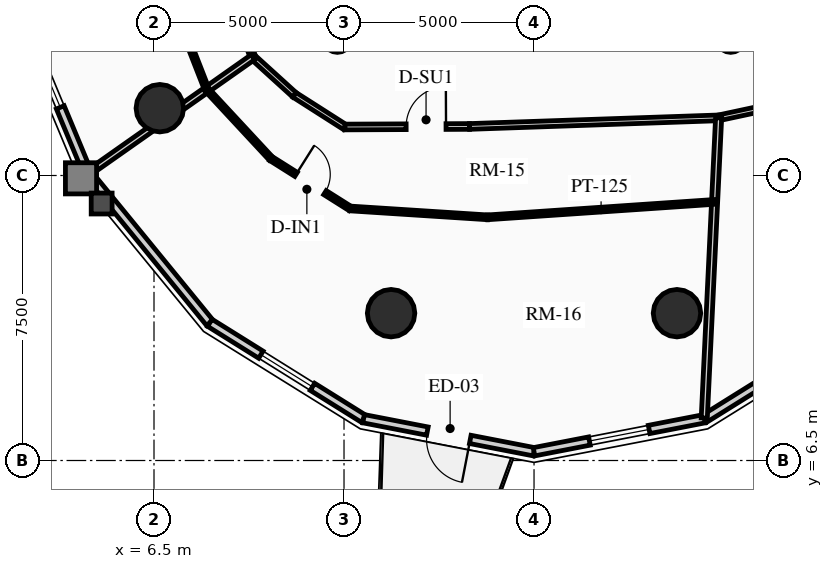
"""IFC4 building model, lengths in metres.
Left out: names, types, materials, properties, quantities, classifications, styles, units other than length and angle.
Written with IfcOpenShell. Run it as: python <this file> out.ifc"""

import sys

from ifc_helpers import new_model, si_unit, direction, frame, frame_2d, origin, origin_2d, place, context, subcontext, project, spatial, rectangle, circle, hollow_circle, extrude, source, transform, mapped, element, fill, save


model = new_model("IFC4")
c1 = context("Model", 3, precision=1e-05, world=origin(), true_north=direction((0.0, 1.0)))
c2 = subcontext(c1, "Body", "Model", "MODEL_VIEW")
j1 = project(units=[si_unit("LENGTHUNIT", "METRE"), si_unit("PLANEANGLEUNIT", "RADIAN")], contexts=[c1])
p1 = place(None, origin())
s1 = spatial("IfcSite", under=j1, at=p1, CompositionType="ELEMENT")
p2 = place(p1, origin())
s2 = spatial("IfcBuilding", under=s1, at=p2, CompositionType="ELEMENT")
p3 = place(p2, frame((0.0, 0.0, 160.33)))
s3 = spatial("IfcBuildingStorey", under=s2, at=p3, CompositionType="ELEMENT", Elevation=160.33)
for number, where, z_axis, x_axis in (
    (1, (11.325, 17.62, 0.0), (0.0, 0.0, 1.0), (1.0, 0.0, 0.0)),
    (2, (21.675, 17.62, 0.0), (0.0, 0.0, 1.0), (1.0, 0.0, 0.0)),
):
    element("IfcColumn", number, at=place(p3, frame(where, z_axis=z_axis, x_axis=x_axis)), inside=s3, PredefinedType="COLUMN", context=c2, shape_type="SweptSolid", body=[
        extrude(hollow_circle(Radius=0.38, WallThickness=0.032, at=origin_2d()), origin(), (0.0, 0.0, 1.0), 2.91),
    ])
for number, where, z_axis, x_axis in (
    (3, (6.653, 15.771, 0.0), (0.0, 0.0, 1.0), (1.0, 0.0, 0.0)),
    (4, (12.739, 10.377, 0.0), (0.0, 0.0, 1.0), (1.0, 0.0, 0.0)),
    (5, (20.261, 10.377, 0.0), (0.0, 0.0, 1.0), (1.0, 0.0, 0.0)),
):
    element("IfcColumn", number, at=place(p3, frame(where, z_axis=z_axis, x_axis=x_axis)), inside=s3, PredefinedType="USERDEFINED", context=c2, shape_type="SweptSolid", body=[
        extrude(circle(Radius=0.625, at=origin_2d()), origin(), (0.0, 0.0, 1.0), 2.91),
    ])
p4 = place(p3, frame((4.757, 14.055, 0.0), z_axis=(0.0, 0.0, 1.0), x_axis=(-0.384259959969, 0.923224936386, 0.0)))
e6 = element("IfcWall", 6, at=p4, inside=s3, PredefinedType="SOLIDWALL", context=c2, shape_type="SweptSolid", body=[
    extrude(rectangle(XDim=5.365, YDim=0.22, at=frame_2d((2.683, 0.0))), origin(), (0.0, 0.0, 1.0), 2.245),
])
m1 = source(origin(), c2, "Body", "SweptSolid", [
    extrude(rectangle(XDim=1.6, YDim=1.3, at=frame_2d((0.8, 0.65))), frame((0.0, 0.12, 0.0), z_axis=(0.0, -1.0, 0.0), x_axis=(1.0, 0.0, 0.0)), (0.0, 0.0, 1.0), 0.24),
])
p5 = place(p4, frame((1.883, 0.0, 0.65)))
e7 = element("IfcOpeningElement", 7, at=p5, cuts=e6, PredefinedType="OPENING", context=c2, shape_type="MappedRepresentation", body=[
    mapped(m1, transform((0.0, 0.0, 0.0), x_axis=(1.0, 0.0, 0.0), y_axis=(0.0, 1.0, 0.0), z_axis=(0.0, 0.0, 1.0), scale=1.0)),
])
p6 = place(p3, frame((7.968, 10.124, 0.0), z_axis=(0.0, 0.0, 1.0), x_axis=(-0.632598524901, 0.774479894053, 0.0)))
e8 = element("IfcWall", 8, at=p6, inside=s3, PredefinedType="SOLIDWALL", context=c2, shape_type="SweptSolid", body=[
    extrude(rectangle(XDim=5.076, YDim=0.22, at=frame_2d((2.538, 0.0))), origin(), (0.0, 0.0, 1.0), 2.245),
])
p7 = place(p3, frame((12.015, 7.6, 0.0), z_axis=(0.0, 0.0, 1.0), x_axis=(-0.848452391194, 0.529271707044, 0.0)))
e9 = element("IfcWall", 9, at=p7, inside=s3, PredefinedType="SOLIDWALL", context=c2, shape_type="SweptSolid", body=[
    extrude(rectangle(XDim=4.769, YDim=0.22, at=frame_2d((2.385, 0.0))), origin(), (0.0, 0.0, 1.0), 2.245),
])
p8 = place(p7, frame((1.585, 0.0, 0.65)))
e10 = element("IfcOpeningElement", 10, at=p8, cuts=e9, PredefinedType="OPENING", context=c2, shape_type="MappedRepresentation", body=[
    mapped(m1, transform((0.0, 0.0, 0.0), x_axis=(1.0, 0.0, 0.0), y_axis=(0.0, 1.0, 0.0), z_axis=(0.0, 0.0, 1.0), scale=1.0)),
])
p9 = place(p3, frame((16.5, 6.73, 0.0), z_axis=(0.0, 0.0, 1.0), x_axis=(-0.981718699963, 0.190337579429, 0.0)))
e11 = element("IfcWall", 11, at=p9, inside=s3, PredefinedType="SOLIDWALL", context=c2, shape_type="SweptSolid", body=[
    extrude(rectangle(XDim=4.569, YDim=0.22, at=frame_2d((2.284, 0.0))), origin(), (0.0, 0.0, 1.0), 2.245),
])
m2 = source(origin(), c2, "Body", "SweptSolid", [
    extrude(rectangle(XDim=1.15, YDim=2.005, at=frame_2d((0.575, 1.002))), frame((0.0, 0.12, 0.0), z_axis=(0.0, -1.0, 0.0), x_axis=(1.0, 0.0, 0.0)), (0.0, 0.0, 1.0), 0.24),
])
p10 = place(p9, frame((1.709, 0.0, 0.0)))
e12 = element("IfcOpeningElement", 12, at=p10, cuts=e11, PredefinedType="OPENING", context=c2, shape_type="MappedRepresentation", body=[
    mapped(m2, transform((0.0, 0.0, 0.0), x_axis=(1.0, 0.0, 0.0), y_axis=(0.0, 1.0, 0.0), z_axis=(0.0, 0.0, 1.0), scale=1.0)),
])
p11 = place(p3, frame((20.985, 7.6, 0.0), z_axis=(0.0, 0.0, 1.0), x_axis=(-0.981718699963, -0.190337579429, 0.0)))
e13 = element("IfcWall", 13, at=p11, inside=s3, PredefinedType="SOLIDWALL", context=c2, shape_type="SweptSolid", body=[
    extrude(rectangle(XDim=4.569, YDim=0.22, at=frame_2d((2.284, 0.0))), origin(), (0.0, 0.0, 1.0), 2.245),
])
p12 = place(p11, frame((1.484, 0.0, 0.65)))
e14 = element("IfcOpeningElement", 14, at=p12, cuts=e13, PredefinedType="OPENING", context=c2, shape_type="MappedRepresentation", body=[
    mapped(m1, transform((0.0, 0.0, 0.0), x_axis=(1.0, 0.0, 0.0), y_axis=(0.0, 1.0, 0.0), z_axis=(0.0, 0.0, 1.0), scale=1.0)),
])
p13 = place(p3, frame((25.032, 10.124, 0.0), z_axis=(0.0, 0.0, 1.0), x_axis=(-0.848452391194, -0.529271707044, 0.0)))
e15 = element("IfcWall", 15, at=p13, inside=s3, PredefinedType="SOLIDWALL", context=c2, shape_type="SweptSolid", body=[
    extrude(rectangle(XDim=4.769, YDim=0.22, at=frame_2d((2.385, 0.0))), origin(), (0.0, 0.0, 1.0), 2.245),
])
p14 = place(p3, frame((8.636, 18.436, 0.0), z_axis=(0.0, 0.0, 1.0), x_axis=(0.333211866524, -0.942851977782, 0.0)))
e16 = element("IfcWall", 16, at=p14, inside=s3, PredefinedType="PARTITIONING", context=c2, shape_type="SweptSolid", body=[
    extrude(rectangle(XDim=1.402, YDim=0.15, at=frame_2d((0.701, 0.0))), origin(), (0.0, 0.0, 1.0), 2.245),
])
p15 = place(p3, frame((9.103, 17.115, 0.0), z_axis=(0.0, 0.0, 1.0), x_axis=(0.740186897911, -0.672401186912, 0.0)))
e17 = element("IfcWall", 17, at=p15, inside=s3, PredefinedType="PARTITIONING", context=c2, shape_type="SweptSolid", body=[
    extrude(rectangle(XDim=1.477, YDim=0.15, at=frame_2d((0.738, 0.0))), origin(), (0.0, 0.0, 1.0), 2.245),
])
p16 = place(p3, frame((10.196, 16.122, 0.0), z_axis=(0.0, 0.0, 1.0), x_axis=(0.843021142441, -0.537880426673, 0.0)))
e18 = element("IfcWall", 18, at=p16, inside=s3, PredefinedType="PARTITIONING", context=c2, shape_type="SweptSolid", body=[
    extrude(rectangle(XDim=1.571, YDim=0.15, at=frame_2d((0.786, 0.0))), origin(), (0.0, 0.0, 1.0), 2.245),
])
p17 = place(p3, frame((11.521, 15.276, 0.0), z_axis=(0.0, 0.0, 1.0), x_axis=(0.999990688463, 0.004315436007, 0.0)))
e19 = element("IfcWall", 19, at=p17, inside=s3, PredefinedType="PARTITIONING", context=c2, shape_type="SweptSolid", body=[
    extrude(rectangle(XDim=3.281, YDim=0.15, at=frame_2d((1.641, 0.0))), origin(), (0.0, 0.0, 1.0), 2.245),
])
m3 = source(origin(), c2, "Body", "SweptSolid", [
    extrude(rectangle(XDim=1.05, YDim=2.015, at=frame_2d((0.525, 1.007))), frame((0.0, 0.085, 0.0), z_axis=(0.0, -1.0, 0.0), x_axis=(1.0, 0.0, 0.0)), (0.0, 0.0, 1.0), 0.17),
])
p18 = place(p17, frame((1.613, 0.0, 0.0)))
e20 = element("IfcOpeningElement", 20, at=p18, cuts=e19, PredefinedType="OPENING", context=c2, shape_type="MappedRepresentation", body=[
    mapped(m3, transform((0.0, 0.0, 0.0), x_axis=(1.0, 0.0, 0.0), y_axis=(0.0, 1.0, 0.0), z_axis=(0.0, 0.0, 1.0), scale=1.0)),
])
p19 = place(p3, frame((14.802, 15.291, 0.0), z_axis=(0.0, 0.0, 1.0), x_axis=(0.999405778293, 0.034468686011, 0.0)))
e21 = element("IfcWall", 21, at=p19, inside=s3, PredefinedType="PARTITIONING", context=c2, shape_type="SweptSolid", body=[
    extrude(rectangle(XDim=6.559, YDim=0.15, at=frame_2d((3.279, 0.0))), origin(), (0.0, 0.0, 1.0), 2.245),
])
p20 = place(p3, frame((21.357, 15.517, 0.0), z_axis=(0.0, 0.0, 1.0), x_axis=(0.977773676035, 0.209663154733, 0.0)))
e22 = element("IfcWall", 22, at=p20, inside=s3, PredefinedType="PARTITIONING", context=c2, shape_type="SweptSolid", body=[
    extrude(rectangle(XDim=1.865, YDim=0.15, at=frame_2d((0.933, 0.0))), origin(), (0.0, 0.0, 1.0), 2.245),
])
p21 = place(p3, frame((9.103, 17.115, 0.0), z_axis=(0.0, 0.0, 1.0), x_axis=(-0.817760605426, -0.575558504597, 0.0)))
e23 = element("IfcWall", 23, at=p21, inside=s3, PredefinedType="PARTITIONING", context=c2, shape_type="SweptSolid", body=[
    extrude(rectangle(XDim=5.295, YDim=0.16, at=frame_2d((2.647, 0.0))), origin(), (0.0, 0.0, 1.0), 2.245),
])
p22 = place(p3, frame((21.357, 15.517, 0.0), z_axis=(0.0, 0.0, 1.0), x_axis=(-0.047796931987, -0.998857073506, 0.0)))
e24 = element("IfcWall", 24, at=p22, inside=s3, PredefinedType="PARTITIONING", context=c2, shape_type="SweptSolid", body=[
    extrude(rectangle(XDim=7.907, YDim=0.16, at=frame_2d((3.954, 0.0))), origin(), (0.0, 0.0, 1.0), 2.245),
])
p23 = place(p3, frame((22.05, 18.0, 0.0), z_axis=(0.0, 0.0, 1.0), x_axis=(0.890660222535, -0.454669515136, 0.0)))
e25 = element("IfcWall", 25, at=p23, inside=s3, PredefinedType="PARTITIONING", context=c2, shape_type="SweptSolid", body=[
    extrude(rectangle(XDim=2.144, YDim=0.16, at=frame_2d((1.072, 0.0))), origin(), (0.0, 0.0, 1.0), 2.245),
])
m4 = source(origin(), c2, "Body", "SweptSolid", [
    extrude(rectangle(XDim=1.05, YDim=2.015, at=frame_2d((0.525, 1.007))), frame((0.0, 0.09, 0.0), z_axis=(0.0, -1.0, 0.0), x_axis=(1.0, 0.0, 0.0)), (0.0, 0.0, 1.0), 0.18),
])
p24 = place(p23, frame((0.894, 0.0, 0.0)))
e26 = element("IfcOpeningElement", 26, at=p24, cuts=e25, PredefinedType="OPENING", context=c2, shape_type="MappedRepresentation", body=[
    mapped(m4, transform((0.0, 0.0, 0.0), x_axis=(1.0, 0.0, 0.0), y_axis=(0.0, 1.0, 0.0), z_axis=(0.0, 0.0, 1.0), scale=1.0)),
])
p25 = place(p3, frame((6.978, 18.598, 0.0), z_axis=(0.0, 0.0, 1.0), x_axis=(0.363845250376, -0.931459410698, 0.0)))
e27 = element("IfcWall", 27, at=p25, inside=s3, PredefinedType="PARTITIONING", context=c2, shape_type="SweptSolid", body=[
    extrude(rectangle(XDim=2.509, YDim=0.125, at=frame_2d((1.254, 0.0))), origin(), (0.0, 0.0, 1.0), 2.245),
])
p26 = place(p3, frame((7.891, 16.261, 0.0), z_axis=(0.0, 0.0, 1.0), x_axis=(0.680443535441, -0.7328005152, 0.0)))
e28 = element("IfcWall", 28, at=p26, inside=s3, PredefinedType="PARTITIONING", context=c2, shape_type="SweptSolid", body=[
    extrude(rectangle(XDim=2.476, YDim=0.125, at=frame_2d((1.238, 0.0))), origin(), (0.0, 0.0, 1.0), 2.245),
])
p27 = place(p3, frame((9.576, 14.447, 0.0), z_axis=(0.0, 0.0, 1.0), x_axis=(0.845905204383, -0.53333327779, 0.0)))
e29 = element("IfcWall", 29, at=p27, inside=s3, PredefinedType="PARTITIONING", context=c2, shape_type="SweptSolid", body=[
    extrude(rectangle(XDim=2.465, YDim=0.125, at=frame_2d((1.232, 0.0))), origin(), (0.0, 0.0, 1.0), 2.245),
])
m5 = source(origin(), c2, "Body", "SweptSolid", [
    extrude(rectangle(XDim=0.9, YDim=2.005, at=frame_2d((0.45, 1.002))), frame((0.0, 0.073, 0.0), z_axis=(0.0, -1.0, 0.0), x_axis=(1.0, 0.0, 0.0)), (0.0, 0.0, 1.0), 0.145),
])
p28 = place(p27, frame((0.782, 0.0, 0.0)))
e30 = element("IfcOpeningElement", 30, at=p28, cuts=e29, PredefinedType="OPENING", context=c2, shape_type="MappedRepresentation", body=[
    mapped(m5, transform((0.0, 0.0, 0.0), x_axis=(1.0, 0.0, 0.0), y_axis=(0.0, 1.0, 0.0), z_axis=(0.0, 0.0, 1.0), scale=1.0)),
])
p29 = place(p3, frame((11.661, 13.132, 0.0), z_axis=(0.0, 0.0, 1.0), x_axis=(0.997932841329, -0.064265419915, 0.0)))
e31 = element("IfcWall", 31, at=p29, inside=s3, PredefinedType="PARTITIONING", context=c2, shape_type="SweptSolid", body=[
    extrude(rectangle(XDim=3.624, YDim=0.125, at=frame_2d((1.812, 0.0))), origin(), (0.0, 0.0, 1.0), 2.245),
])
p30 = place(p3, frame((15.278, 12.899, 0.0), z_axis=(0.0, 0.0, 1.0), x_axis=(0.997695501463, 0.067850470592, 0.0)))
e32 = element("IfcWall", 32, at=p30, inside=s3, PredefinedType="PARTITIONING", context=c2, shape_type="SweptSolid", body=[
    extrude(rectangle(XDim=5.988, YDim=0.125, at=frame_2d((2.994, 0.0))), origin(), (0.0, 0.0, 1.0), 2.245),
])
m6 = source(origin(), c2, "Body", "SweptSolid", [
    extrude(rectangle(XDim=1.6, YDim=1.3, at=frame_2d((0.8, 0.65))), frame((0.0, 0.03, 0.0), z_axis=(0.0, -1.0, 0.0), x_axis=(1.0, 0.0, 0.0)), (0.0, 0.0, 1.0), 0.06),
])
p31 = place(p5, origin())
e33 = element("IfcWindow", 33, at=p31, inside=s3, PartitioningType="SINGLE_PANEL", PredefinedType="WINDOW", context=c2, shape_type="MappedRepresentation", body=[
    mapped(m6, transform((0.0, 0.0, 0.0), x_axis=(1.0, 0.0, 0.0), y_axis=(0.0, 1.0, 0.0), z_axis=(0.0, 0.0, 1.0), scale=1.0)),
])
fill(e7, e33)
p32 = place(p8, origin())
e34 = element("IfcWindow", 34, at=p32, inside=s3, PartitioningType="SINGLE_PANEL", PredefinedType="WINDOW", context=c2, shape_type="MappedRepresentation", body=[
    mapped(m6, transform((0.0, 0.0, 0.0), x_axis=(1.0, 0.0, 0.0), y_axis=(0.0, 1.0, 0.0), z_axis=(0.0, 0.0, 1.0), scale=1.0)),
])
fill(e10, e34)
m7 = source(origin(), c2, "Body", "SweptSolid", [
    extrude(rectangle(XDim=1.15, YDim=2.005, at=frame_2d((0.575, 1.002))), frame((0.0, 0.025, 0.0), z_axis=(0.0, -1.0, 0.0), x_axis=(1.0, 0.0, 0.0)), (0.0, 0.0, 1.0), 0.05),
])
p33 = place(p10, origin())
e35 = element("IfcDoor", 35, at=p33, inside=s3, OperationType="SINGLE_SWING_LEFT", PredefinedType="DOOR", context=c2, shape_type="MappedRepresentation", body=[
    mapped(m7, transform((0.0, 0.0, 0.0), x_axis=(1.0, 0.0, 0.0), y_axis=(0.0, 1.0, 0.0), z_axis=(0.0, 0.0, 1.0), scale=1.0)),
])
fill(e12, e35)
p34 = place(p12, origin())
e36 = element("IfcWindow", 36, at=p34, inside=s3, PartitioningType="SINGLE_PANEL", PredefinedType="WINDOW", context=c2, shape_type="MappedRepresentation", body=[
    mapped(m6, transform((0.0, 0.0, 0.0), x_axis=(1.0, 0.0, 0.0), y_axis=(0.0, 1.0, 0.0), z_axis=(0.0, 0.0, 1.0), scale=1.0)),
])
fill(e14, e36)
m8 = source(origin(), c2, "Body", "SweptSolid", [
    extrude(rectangle(XDim=1.05, YDim=2.015, at=frame_2d((0.525, 1.007))), frame((0.0, 0.025, 0.0), z_axis=(0.0, -1.0, 0.0), x_axis=(1.0, 0.0, 0.0)), (0.0, 0.0, 1.0), 0.05),
])
p35 = place(p18, origin())
e37 = element("IfcDoor", 37, at=p35, inside=s3, OperationType="SINGLE_SWING_RIGHT", PredefinedType="DOOR", context=c2, shape_type="MappedRepresentation", body=[
    mapped(m8, transform((0.0, 0.0, 0.0), x_axis=(1.0, 0.0, 0.0), y_axis=(0.0, 1.0, 0.0), z_axis=(0.0, 0.0, 1.0), scale=1.0)),
])
fill(e20, e37)
m9 = source(origin(), c2, "Body", "SweptSolid", [
    extrude(rectangle(XDim=0.9, YDim=2.005, at=frame_2d((0.45, 1.002))), frame((0.0, 0.025, 0.0), z_axis=(0.0, -1.0, 0.0), x_axis=(1.0, 0.0, 0.0)), (0.0, 0.0, 1.0), 0.05),
])
p36 = place(p28, origin())
e38 = element("IfcDoor", 38, at=p36, inside=s3, OperationType="SINGLE_SWING_LEFT", PredefinedType="DOOR", context=c2, shape_type="MappedRepresentation", body=[
    mapped(m9, transform((0.0, 0.0, 0.0), x_axis=(1.0, 0.0, 0.0), y_axis=(0.0, 1.0, 0.0), z_axis=(0.0, 0.0, 1.0), scale=1.0)),
])
fill(e30, e38)
save(model, sys.argv[1])
